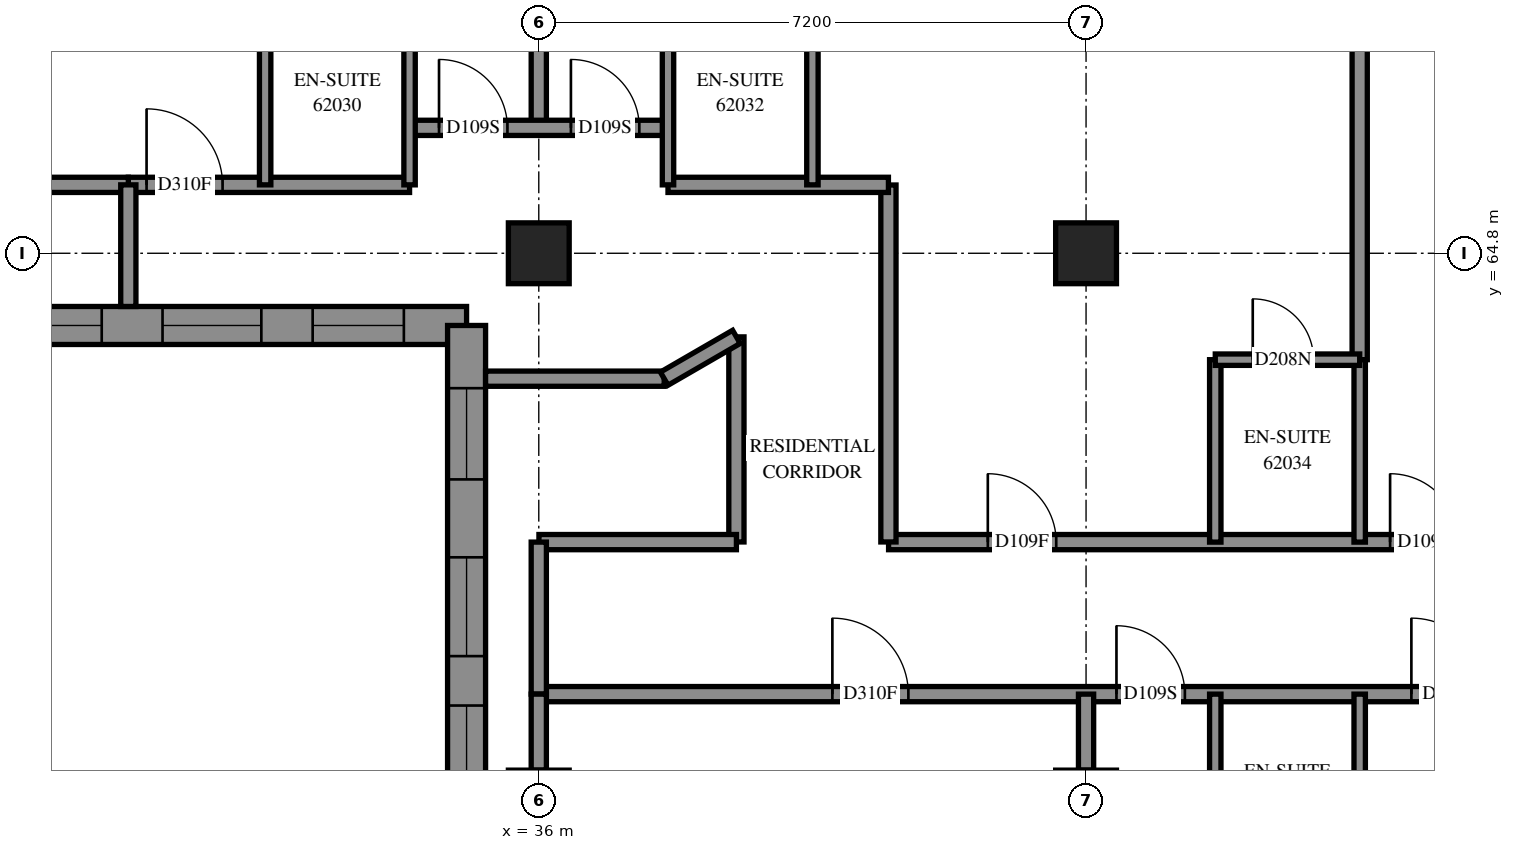
"""IFC4 building model, lengths in metres.
Left out: names, types, materials, properties, quantities, classifications, styles, units other than length and angle.
Written with IfcOpenShell. Run it as: python <this file> out.ifc"""

import sys

from ifc_helpers import new_model, si_unit, direction, frame, frame_2d, origin, origin_2d, place, context, subcontext, project, spatial, polyline, rectangle, outline, extrude, element, fill, save


model = new_model("IFC4")
c1 = context("Model", 3, precision=1e-05, world=origin(), true_north=direction((0.0, 1.0)))
c2 = subcontext(c1, "Body", "Model", "MODEL_VIEW")
j1 = project(units=[si_unit("LENGTHUNIT", "METRE"), si_unit("PLANEANGLEUNIT", "RADIAN")], contexts=[c1])
p1 = place(None, origin())
s1 = spatial("IfcSite", under=j1, at=p1, CompositionType="ELEMENT")
p2 = place(p1, origin())
s2 = spatial("IfcBuilding", under=s1, at=p2, CompositionType="ELEMENT")
p3 = place(p2, frame((0.0, 0.0, 227.0)))
s3 = spatial("IfcBuildingStorey", under=s2, at=p3, CompositionType="ELEMENT", Elevation=227.0)
for number, where, z_axis, x_axis in (
    (1, (36.0, 64.8, 0.0), (0.0, 0.0, 1.0), (1.0, 0.0, 0.0)),
    (2, (43.2, 64.8, 0.0), (0.0, 0.0, 1.0), (1.0, 0.0, 0.0)),
):
    element("IfcColumn", number, at=place(p3, frame(where, z_axis=z_axis, x_axis=x_axis)), inside=s3, PredefinedType="COLUMN", context=c2, shape_type="SweptSolid", body=[
        extrude(rectangle(XDim=0.8, YDim=0.8, at=origin_2d()), origin(), (0.0, 0.0, 1.0), 3.1),
    ])
p4 = place(p3, frame((26.617, 63.85, 0.0), z_axis=(0.0, 0.0, 1.0), x_axis=(1.0, 0.0, 0.0)))
e3 = element("IfcWall", 3, at=p4, inside=s3, PredefinedType="SOLIDWALL", context=c2, shape_type="SweptSolid", body=[
    extrude(outline(polyline([(-0.25, -0.25), (8.183, -0.25), (8.683, 0.25), (0.25, 0.25), (-0.25, -0.25)])), origin(), (0.0, 0.0, 1.0), 3.1),
])
p5 = place(p4, frame((2.333, 0.0, 0.45)))
e4 = element("IfcOpeningElement", 4, at=p5, cuts=e3, PredefinedType="OPENING", context=c2, shape_type="SweptSolid", body=[
    extrude(rectangle(XDim=1.3, YDim=2.5, at=frame_2d((0.65, 1.25))), frame((0.0, 0.26, 0.0), z_axis=(0.0, -1.0, 0.0), x_axis=(1.0, 0.0, 0.0)), (0.0, 0.0, 1.0), 0.52),
])
p6 = place(p4, frame((4.433, 0.0, 0.45)))
e5 = element("IfcOpeningElement", 5, at=p6, cuts=e3, PredefinedType="OPENING", context=c2, shape_type="SweptSolid", body=[
    extrude(rectangle(XDim=1.3, YDim=2.5, at=frame_2d((0.65, 1.25))), frame((0.0, 0.26, 0.0), z_axis=(0.0, -1.0, 0.0), x_axis=(1.0, 0.0, 0.0)), (0.0, 0.0, 1.0), 0.52),
])
p7 = place(p4, frame((0.717, 0.0, 0.45)))
e6 = element("IfcOpeningElement", 6, at=p7, cuts=e3, PredefinedType="OPENING", context=c2, shape_type="SweptSolid", body=[
    extrude(rectangle(XDim=1.2, YDim=2.5, at=frame_2d((0.6, 1.25))), frame((0.0, 0.26, 0.0), z_axis=(0.0, -1.0, 0.0), x_axis=(1.0, 0.0, 0.0)), (0.0, 0.0, 1.0), 0.52),
])
p8 = place(p4, frame((6.408, 0.0, 0.45)))
e7 = element("IfcOpeningElement", 7, at=p8, cuts=e3, PredefinedType="OPENING", context=c2, shape_type="SweptSolid", body=[
    extrude(rectangle(XDim=1.2, YDim=2.5, at=frame_2d((0.6, 1.25))), frame((0.0, 0.26, 0.0), z_axis=(0.0, -1.0, 0.0), x_axis=(1.0, 0.0, 0.0)), (0.0, 0.0, 1.0), 0.52),
])
p9 = place(p3, frame((35.05, 63.85, 0.0), z_axis=(0.0, 0.0, 1.0), x_axis=(0.0, -1.0, 0.0)))
e8 = element("IfcWall", 8, at=p9, inside=s3, PredefinedType="SOLIDWALL", context=c2, shape_type="SweptSolid", body=[
    extrude(outline(polyline([(0.25, -0.25), (7.45, -0.25), (6.95, 0.25), (-0.25, 0.25), (0.25, -0.25)])), origin(), (0.0, 0.0, 1.0), 3.1),
])
p10 = place(p9, frame((3.05, 0.0, 0.45)))
e9 = element("IfcOpeningElement", 9, at=p10, cuts=e8, PredefinedType="OPENING", context=c2, shape_type="SweptSolid", body=[
    extrude(rectangle(XDim=1.3, YDim=2.5, at=frame_2d((0.65, 1.25))), frame((0.0, 0.26, 0.0), z_axis=(0.0, -1.0, 0.0), x_axis=(1.0, 0.0, 0.0)), (0.0, 0.0, 1.0), 0.52),
])
p11 = place(p9, frame((5.0, 0.0, 0.45)))
e10 = element("IfcOpeningElement", 10, at=p11, cuts=e8, PredefinedType="OPENING", context=c2, shape_type="SweptSolid", body=[
    extrude(rectangle(XDim=1.3, YDim=2.5, at=frame_2d((0.65, 1.25))), frame((0.0, 0.26, 0.0), z_axis=(0.0, -1.0, 0.0), x_axis=(1.0, 0.0, 0.0)), (0.0, 0.0, 1.0), 0.52),
])
p12 = place(p9, frame((0.825, 0.0, 0.45)))
e11 = element("IfcOpeningElement", 11, at=p12, cuts=e8, PredefinedType="OPENING", context=c2, shape_type="SweptSolid", body=[
    extrude(rectangle(XDim=1.2, YDim=2.5, at=frame_2d((0.6, 1.25))), frame((0.0, 0.26, 0.0), z_axis=(0.0, -1.0, 0.0), x_axis=(1.0, 0.0, 0.0)), (0.0, 0.0, 1.0), 0.52),
])
p13 = place(p3, frame((36.0, 59.0, 0.0), z_axis=(0.0, 0.0, 1.0), x_axis=(1.0, 0.0, 0.0)))
e12 = element("IfcWall", 12, at=p13, inside=s3, PredefinedType="PARTITIONING", context=c2, shape_type="SweptSolid", body=[
    extrude(rectangle(XDim=17.0, YDim=0.2, at=frame_2d((8.5, 0.0))), origin(), (0.0, 0.0, 1.0), 3.1),
])
p14 = place(p13, frame((3.862, 0.0, 0.0)))
e13 = element("IfcOpeningElement", 13, at=p14, cuts=e12, PredefinedType="OPENING", context=c2, shape_type="SweptSolid", body=[
    extrude(rectangle(XDim=1.0, YDim=2.1, at=frame_2d((0.5, 1.05))), frame((0.0, 0.11, 0.0), z_axis=(0.0, -1.0, 0.0), x_axis=(1.0, 0.0, 0.0)), (0.0, 0.0, 1.0), 0.22),
])
p15 = place(p13, frame((7.6, 0.0, 0.0)))
e14 = element("IfcOpeningElement", 14, at=p15, cuts=e12, PredefinedType="OPENING", context=c2, shape_type="SweptSolid", body=[
    extrude(rectangle(XDim=0.9, YDim=2.1, at=frame_2d((0.45, 1.05))), frame((0.0, 0.11, 0.0), z_axis=(0.0, -1.0, 0.0), x_axis=(1.0, 0.0, 0.0)), (0.0, 0.0, 1.0), 0.22),
])
p16 = place(p13, frame((11.48, 0.0, 0.0)))
e15 = element("IfcOpeningElement", 15, at=p16, cuts=e12, PredefinedType="OPENING", context=c2, shape_type="SweptSolid", body=[
    extrude(rectangle(XDim=1.0, YDim=2.1, at=frame_2d((0.5, 1.05))), frame((0.0, 0.11, 0.0), z_axis=(0.0, -1.0, 0.0), x_axis=(1.0, 0.0, 0.0)), (0.0, 0.0, 1.0), 0.22),
])
p17 = place(p13, frame((15.805, 0.0, 0.0)))
e16 = element("IfcOpeningElement", 16, at=p17, cuts=e12, PredefinedType="OPENING", context=c2, shape_type="SweptSolid", body=[
    extrude(rectangle(XDim=1.0, YDim=2.1, at=frame_2d((0.5, 1.05))), frame((0.0, 0.11, 0.0), z_axis=(0.0, -1.0, 0.0), x_axis=(1.0, 0.0, 0.0)), (0.0, 0.0, 1.0), 0.22),
])
p18 = place(p3, frame((40.602, 61.0, 0.0), z_axis=(0.0, 0.0, 1.0), x_axis=(1.0, 0.0, 0.0)))
e17 = element("IfcWall", 17, at=p18, inside=s3, PredefinedType="PARTITIONING", context=c2, shape_type="SweptSolid", body=[
    extrude(rectangle(XDim=14.998, YDim=0.2, at=frame_2d((7.499, 0.0))), origin(), (0.0, 0.0, 1.0), 3.1),
])
p19 = place(p18, frame((1.306, 0.0, 0.0)))
e18 = element("IfcOpeningElement", 18, at=p19, cuts=e17, PredefinedType="OPENING", context=c2, shape_type="SweptSolid", body=[
    extrude(rectangle(XDim=0.9, YDim=2.1, at=frame_2d((0.45, 1.05))), frame((0.0, 0.11, 0.0), z_axis=(0.0, -1.0, 0.0), x_axis=(1.0, 0.0, 0.0)), (0.0, 0.0, 1.0), 0.22),
])
p20 = place(p18, frame((6.598, 0.0, 0.0)))
e19 = element("IfcOpeningElement", 19, at=p20, cuts=e17, PredefinedType="OPENING", context=c2, shape_type="SweptSolid", body=[
    extrude(rectangle(XDim=0.9, YDim=2.1, at=frame_2d((0.45, 1.05))), frame((0.0, 0.11, 0.0), z_axis=(0.0, -1.0, 0.0), x_axis=(1.0, 0.0, 0.0)), (0.0, 0.0, 1.0), 0.22),
])
p21 = place(p18, frame((12.098, 0.0, 0.0)))
e20 = element("IfcOpeningElement", 20, at=p21, cuts=e17, PredefinedType="OPENING", context=c2, shape_type="SweptSolid", body=[
    extrude(rectangle(XDim=0.9, YDim=2.1, at=frame_2d((0.45, 1.05))), frame((0.0, 0.11, 0.0), z_axis=(0.0, -1.0, 0.0), x_axis=(1.0, 0.0, 0.0)), (0.0, 0.0, 1.0), 0.22),
])
p22 = place(p18, frame((13.752, 0.0, 0.0)))
e21 = element("IfcOpeningElement", 21, at=p22, cuts=e17, PredefinedType="OPENING", context=c2, shape_type="SweptSolid", body=[
    extrude(rectangle(XDim=1.0, YDim=2.1, at=frame_2d((0.5, 1.05))), frame((0.0, 0.11, 0.0), z_axis=(0.0, -1.0, 0.0), x_axis=(1.0, 0.0, 0.0)), (0.0, 0.0, 1.0), 0.22),
])
p23 = place(p3, frame((46.8, 63.4, 0.0), z_axis=(0.0, 0.0, 1.0), x_axis=(0.0, 1.0, 0.0)))
e22 = element("IfcWall", 22, at=p23, inside=s3, PredefinedType="PARTITIONING", context=c2, shape_type="SweptSolid", body=[
    extrude(rectangle(XDim=9.492, YDim=0.2, at=frame_2d((4.746, 0.0))), origin(), (0.0, 0.0, 1.0), 3.1),
])
p24 = place(p3, frame((36.0, 66.45, 0.0), z_axis=(0.0, 0.0, 1.0), x_axis=(0.0, 1.0, 0.0)))
e23 = element("IfcWall", 23, at=p24, inside=s3, PredefinedType="PARTITIONING", context=c2, shape_type="SweptSolid", body=[
    extrude(rectangle(XDim=5.15, YDim=0.2, at=frame_2d((2.575, 0.0))), origin(), (0.0, 0.0, 1.0), 3.1),
])
p25 = place(p3, frame((40.6, 61.002, 0.0), z_axis=(0.0, 0.0, 1.0), x_axis=(0.0, 1.0, 0.0)))
e24 = element("IfcWall", 24, at=p25, inside=s3, PredefinedType="PARTITIONING", context=c2, shape_type="SweptSolid", body=[
    extrude(rectangle(XDim=4.696, YDim=0.2, at=frame_2d((2.348, 0.0))), origin(), (0.0, 0.0, 1.0), 3.1),
])
p26 = place(p3, frame((30.6, 65.7, 0.0), z_axis=(0.0, 0.0, 1.0), x_axis=(1.0, 0.0, 0.0)))
e25 = element("IfcWall", 25, at=p26, inside=s3, PredefinedType="PARTITIONING", context=c2, shape_type="SweptSolid", body=[
    extrude(rectangle(XDim=3.7, YDim=0.2, at=frame_2d((1.85, 0.0))), origin(), (0.0, 0.0, 1.0), 3.1),
])
p27 = place(p26, frame((0.24, 0.0, 0.0)))
e26 = element("IfcOpeningElement", 26, at=p27, cuts=e25, PredefinedType="OPENING", context=c2, shape_type="SweptSolid", body=[
    extrude(rectangle(XDim=1.0, YDim=2.1, at=frame_2d((0.5, 1.05))), frame((0.0, 0.11, 0.0), z_axis=(0.0, -1.0, 0.0), x_axis=(1.0, 0.0, 0.0)), (0.0, 0.0, 1.0), 0.22),
])
p28 = place(p3, frame((34.35, 66.45, 0.0), z_axis=(0.0, 0.0, 1.0), x_axis=(1.0, 0.0, 0.0)))
e27 = element("IfcWall", 27, at=p28, inside=s3, PredefinedType="PARTITIONING", context=c2, shape_type="SweptSolid", body=[
    extrude(rectangle(XDim=3.3, YDim=0.2, at=frame_2d((1.65, 0.0))), origin(), (0.0, 0.0, 1.0), 3.1),
])
p29 = place(p28, frame((0.338, 0.0, 0.0)))
e28 = element("IfcOpeningElement", 28, at=p29, cuts=e27, PredefinedType="OPENING", context=c2, shape_type="SweptSolid", body=[
    extrude(rectangle(XDim=0.9, YDim=2.1, at=frame_2d((0.45, 1.05))), frame((0.0, 0.11, 0.0), z_axis=(0.0, -1.0, 0.0), x_axis=(1.0, 0.0, 0.0)), (0.0, 0.0, 1.0), 0.22),
])
p30 = place(p28, frame((2.073, 0.0, 0.0)))
e29 = element("IfcOpeningElement", 29, at=p30, cuts=e27, PredefinedType="OPENING", context=c2, shape_type="SweptSolid", body=[
    extrude(rectangle(XDim=0.9, YDim=2.1, at=frame_2d((0.45, 1.05))), frame((0.0, 0.11, 0.0), z_axis=(0.0, -1.0, 0.0), x_axis=(1.0, 0.0, 0.0)), (0.0, 0.0, 1.0), 0.22),
])
p31 = place(p3, frame((37.7, 65.7, 0.0), z_axis=(0.0, 0.0, 1.0), x_axis=(1.0, 0.0, 0.0)))
e30 = element("IfcWall", 30, at=p31, inside=s3, PredefinedType="PARTITIONING", context=c2, shape_type="SweptSolid", body=[
    extrude(rectangle(XDim=2.9, YDim=0.2, at=frame_2d((1.45, 0.0))), origin(), (0.0, 0.0, 1.0), 3.1),
])
p32 = place(p3, frame((38.6, 61.002, 0.0), z_axis=(0.0, 0.0, 1.0), x_axis=(0.0, 1.0, 0.0)))
e31 = element("IfcWall", 31, at=p32, inside=s3, PredefinedType="PARTITIONING", context=c2, shape_type="SweptSolid", body=[
    extrude(rectangle(XDim=2.698, YDim=0.2, at=frame_2d((1.349, 0.0))), origin(), (0.0, 0.0, 1.0), 3.1),
])
p33 = place(p3, frame((36.002, 61.0, 0.0), z_axis=(0.0, 0.0, 1.0), x_axis=(1.0, 0.0, 0.0)))
e32 = element("IfcWall", 32, at=p33, inside=s3, PredefinedType="PARTITIONING", context=c2, shape_type="SweptSolid", body=[
    extrude(rectangle(XDim=2.598, YDim=0.2, at=frame_2d((1.299, 0.0))), origin(), (0.0, 0.0, 1.0), 3.1),
])
for number, where, z_axis, x_axis in (
    (33, (44.9, 56.6, 0.0), (0.0, 0.0, 1.0), (0.0, 1.0, 0.0)),
    (34, (44.9, 61.0, 0.0), (0.0, 0.0, 1.0), (0.0, 1.0, 0.0)),
    (35, (46.8, 56.6, 0.0), (0.0, 0.0, 1.0), (0.0, 1.0, 0.0)),
    (36, (46.8, 61.0, 0.0), (0.0, 0.0, 1.0), (0.0, 1.0, 0.0)),
    (37, (32.4, 65.7, 0.0), (0.0, 0.0, 1.0), (0.0, 1.0, 0.0)),
    (38, (34.3, 65.7, 0.0), (0.0, 0.0, 1.0), (0.0, 1.0, 0.0)),
    (39, (37.7, 65.7, 0.0), (0.0, 0.0, 1.0), (0.0, 1.0, 0.0)),
    (40, (39.6, 65.7, 0.0), (0.0, 0.0, 1.0), (0.0, 1.0, 0.0)),
):
    element("IfcWall", number, at=place(p3, frame(where, z_axis=z_axis, x_axis=x_axis)), inside=s3, PredefinedType="PARTITIONING", context=c2, shape_type="SweptSolid", body=[
        extrude(rectangle(XDim=2.4, YDim=0.15, at=frame_2d((1.2, 0.0))), origin(), (0.0, 0.0, 1.0), 3.1),
    ])
p34 = place(p3, frame((35.3, 63.15, 0.0), z_axis=(0.0, 0.0, 1.0), x_axis=(1.0, 0.0, 0.0)))
e41 = element("IfcWall", 41, at=p34, inside=s3, PredefinedType="PARTITIONING", context=c2, shape_type="SweptSolid", body=[
    extrude(rectangle(XDim=2.35, YDim=0.2, at=frame_2d((1.175, 0.0))), origin(), (0.0, 0.0, 1.0), 3.1),
])
p35 = place(p3, frame((36.0, 59.0, 0.0), z_axis=(0.0, 0.0, 1.0), x_axis=(0.0, 1.0, 0.0)))
e42 = element("IfcWall", 42, at=p35, inside=s3, PredefinedType="PARTITIONING", context=c2, shape_type="SweptSolid", body=[
    extrude(rectangle(XDim=2.0, YDim=0.2, at=frame_2d((1.0, 0.0))), origin(), (0.0, 0.0, 1.0), 2.6),
])
p36 = place(p3, frame((44.9, 63.4, 0.0), z_axis=(0.0, 0.0, 1.0), x_axis=(1.0, 0.0, 0.0)))
e43 = element("IfcWall", 43, at=p36, inside=s3, PredefinedType="PARTITIONING", context=c2, shape_type="SweptSolid", body=[
    extrude(rectangle(XDim=1.9, YDim=0.15, at=frame_2d((0.95, 0.0))), origin(), (0.0, 0.0, 1.0), 3.1),
])
p37 = place(p36, frame((0.493, 0.0, 0.0)))
e44 = element("IfcOpeningElement", 44, at=p37, cuts=e43, PredefinedType="OPENING", context=c2, shape_type="SweptSolid", body=[
    extrude(rectangle(XDim=0.8, YDim=2.1, at=frame_2d((0.4, 1.05))), frame((0.0, 0.085, 0.0), z_axis=(0.0, -1.0, 0.0), x_axis=(1.0, 0.0, 0.0)), (0.0, 0.0, 1.0), 0.17),
])
p38 = place(p3, frame((28.802, 65.7, 0.0), z_axis=(0.0, 0.0, 1.0), x_axis=(1.0, 0.0, 0.0)))
e45 = element("IfcWall", 45, at=p38, inside=s3, PredefinedType="PARTITIONING", context=c2, shape_type="SweptSolid", body=[
    extrude(rectangle(XDim=1.798, YDim=0.2, at=frame_2d((0.899, 0.0))), origin(), (0.0, 0.0, 1.0), 3.1),
])
p39 = place(p3, frame((30.6, 64.1, 0.0), z_axis=(0.0, 0.0, 1.0), x_axis=(0.0, 1.0, 0.0)))
e46 = element("IfcWall", 46, at=p39, inside=s3, PredefinedType="PARTITIONING", context=c2, shape_type="SweptSolid", body=[
    extrude(rectangle(XDim=1.6, YDim=0.2, at=frame_2d((0.8, 0.0))), origin(), (0.0, 0.0, 1.0), 3.1),
])
p40 = place(p3, frame((36.0, 58.0, 0.0), z_axis=(0.0, 0.0, 1.0), x_axis=(0.0, 1.0, 0.0)))
e47 = element("IfcWall", 47, at=p40, inside=s3, PredefinedType="PARTITIONING", context=c2, shape_type="SweptSolid", body=[
    extrude(rectangle(XDim=1.0, YDim=0.2, at=frame_2d((0.5, 0.0))), origin(), (0.0, 0.0, 1.0), 2.6),
])
p41 = place(p3, frame((43.2, 58.0, 0.0), z_axis=(0.0, 0.0, 1.0), x_axis=(0.0, 1.0, 0.0)))
e48 = element("IfcWall", 48, at=p41, inside=s3, PredefinedType="PARTITIONING", context=c2, shape_type="SweptSolid", body=[
    extrude(rectangle(XDim=1.0, YDim=0.2, at=frame_2d((0.5, 0.0))), origin(), (0.0, 0.0, 1.0), 3.1),
])
p42 = place(p3, frame((37.65, 63.15, 0.0), z_axis=(0.0, 0.0, 1.0), x_axis=(0.8654262855, 0.5010362705, 0.0)))
e49 = element("IfcWall", 49, at=p42, inside=s3, PredefinedType="PARTITIONING", context=c2, shape_type="SweptSolid", body=[
    extrude(rectangle(XDim=1.098, YDim=0.2, at=frame_2d((0.549, 0.0))), origin(), (0.0, 0.0, 1.0), 3.1),
])
p43 = place(p5, origin())
e50 = element("IfcWindow", 50, at=p43, inside=s3, PartitioningType="SINGLE_PANEL", PredefinedType="WINDOW", context=c2, shape_type="SweptSolid", body=[
    extrude(rectangle(XDim=1.3, YDim=2.5, at=frame_2d((0.65, 1.25))), frame((0.0, 0.18, 0.0), z_axis=(0.0, -1.0, 0.0), x_axis=(1.0, 0.0, 0.0)), (0.0, 0.0, 1.0), 0.06),
])
fill(e4, e50)
p44 = place(p6, origin())
e51 = element("IfcWindow", 51, at=p44, inside=s3, PartitioningType="SINGLE_PANEL", PredefinedType="WINDOW", context=c2, shape_type="SweptSolid", body=[
    extrude(rectangle(XDim=1.3, YDim=2.5, at=frame_2d((0.65, 1.25))), frame((0.0, 0.18, 0.0), z_axis=(0.0, -1.0, 0.0), x_axis=(1.0, 0.0, 0.0)), (0.0, 0.0, 1.0), 0.06),
])
fill(e5, e51)
p45 = place(p8, origin())
e52 = element("IfcWindow", 52, at=p45, inside=s3, PartitioningType="SINGLE_PANEL", PredefinedType="WINDOW", context=c2, shape_type="SweptSolid", body=[
    extrude(rectangle(XDim=1.2, YDim=2.5, at=frame_2d((0.6, 1.25))), frame((0.0, 0.18, 0.0), z_axis=(0.0, -1.0, 0.0), x_axis=(1.0, 0.0, 0.0)), (0.0, 0.0, 1.0), 0.06),
])
fill(e7, e52)
p46 = place(p10, origin())
e53 = element("IfcWindow", 53, at=p46, inside=s3, PartitioningType="SINGLE_PANEL", PredefinedType="WINDOW", context=c2, shape_type="SweptSolid", body=[
    extrude(rectangle(XDim=1.3, YDim=2.5, at=frame_2d((0.65, 1.25))), frame((0.0, 0.18, 0.0), z_axis=(0.0, -1.0, 0.0), x_axis=(1.0, 0.0, 0.0)), (0.0, 0.0, 1.0), 0.06),
])
fill(e9, e53)
p47 = place(p11, origin())
e54 = element("IfcWindow", 54, at=p47, inside=s3, PartitioningType="SINGLE_PANEL", PredefinedType="WINDOW", context=c2, shape_type="SweptSolid", body=[
    extrude(rectangle(XDim=1.3, YDim=2.5, at=frame_2d((0.65, 1.25))), frame((0.0, 0.18, 0.0), z_axis=(0.0, -1.0, 0.0), x_axis=(1.0, 0.0, 0.0)), (0.0, 0.0, 1.0), 0.06),
])
fill(e10, e54)
p48 = place(p12, origin())
e55 = element("IfcWindow", 55, at=p48, inside=s3, PartitioningType="SINGLE_PANEL", PredefinedType="WINDOW", context=c2, shape_type="SweptSolid", body=[
    extrude(rectangle(XDim=1.2, YDim=2.5, at=frame_2d((0.6, 1.25))), frame((0.0, 0.18, 0.0), z_axis=(0.0, -1.0, 0.0), x_axis=(1.0, 0.0, 0.0)), (0.0, 0.0, 1.0), 0.06),
])
fill(e11, e55)
p49 = place(p14, origin())
e56 = element("IfcDoor", 56, at=p49, inside=s3, OperationType="SINGLE_SWING_LEFT", PredefinedType="DOOR", context=c2, shape_type="SweptSolid", body=[
    extrude(rectangle(XDim=1.0, YDim=2.1, at=frame_2d((0.5, 1.05))), frame((0.0, 0.025, 0.0), z_axis=(0.0, -1.0, 0.0), x_axis=(1.0, 0.0, 0.0)), (0.0, 0.0, 1.0), 0.05),
])
fill(e13, e56)
p50 = place(p15, origin())
e57 = element("IfcDoor", 57, at=p50, inside=s3, OperationType="SINGLE_SWING_LEFT", PredefinedType="DOOR", context=c2, shape_type="SweptSolid", body=[
    extrude(rectangle(XDim=0.9, YDim=2.1, at=frame_2d((0.45, 1.05))), frame((0.0, 0.025, 0.0), z_axis=(0.0, -1.0, 0.0), x_axis=(1.0, 0.0, 0.0)), (0.0, 0.0, 1.0), 0.05),
])
fill(e14, e57)
p51 = place(p16, origin())
e58 = element("IfcDoor", 58, at=p51, inside=s3, OperationType="SINGLE_SWING_RIGHT", PredefinedType="DOOR", context=c2, shape_type="SweptSolid", body=[
    extrude(rectangle(XDim=1.0, YDim=2.1, at=frame_2d((0.5, 1.05))), frame((0.0, 0.025, 0.0), z_axis=(0.0, -1.0, 0.0), x_axis=(1.0, 0.0, 0.0)), (0.0, 0.0, 1.0), 0.05),
])
fill(e15, e58)
p52 = place(p27, origin())
e59 = element("IfcDoor", 59, at=p52, inside=s3, OperationType="SINGLE_SWING_RIGHT", PredefinedType="DOOR", context=c2, shape_type="SweptSolid", body=[
    extrude(rectangle(XDim=1.0, YDim=2.1, at=frame_2d((0.5, 1.05))), frame((0.0, 0.025, 0.0), z_axis=(0.0, -1.0, 0.0), x_axis=(1.0, 0.0, 0.0)), (0.0, 0.0, 1.0), 0.05),
])
fill(e26, e59)
p53 = place(p29, origin())
e60 = element("IfcDoor", 60, at=p53, inside=s3, OperationType="SINGLE_SWING_LEFT", PredefinedType="DOOR", context=c2, shape_type="SweptSolid", body=[
    extrude(rectangle(XDim=0.9, YDim=2.1, at=frame_2d((0.45, 1.05))), frame((0.0, 0.025, 0.0), z_axis=(0.0, -1.0, 0.0), x_axis=(1.0, 0.0, 0.0)), (0.0, 0.0, 1.0), 0.05),
])
fill(e28, e60)
p54 = place(p30, origin())
e61 = element("IfcDoor", 61, at=p54, inside=s3, OperationType="SINGLE_SWING_RIGHT", PredefinedType="DOOR", context=c2, shape_type="SweptSolid", body=[
    extrude(rectangle(XDim=0.9, YDim=2.1, at=frame_2d((0.45, 1.05))), frame((0.0, 0.025, 0.0), z_axis=(0.0, -1.0, 0.0), x_axis=(1.0, 0.0, 0.0)), (0.0, 0.0, 1.0), 0.05),
])
fill(e29, e61)
p55 = place(p19, origin())
e62 = element("IfcDoor", 62, at=p55, inside=s3, OperationType="SINGLE_SWING_LEFT", PredefinedType="DOOR", context=c2, shape_type="SweptSolid", body=[
    extrude(rectangle(XDim=0.9, YDim=2.1, at=frame_2d((0.45, 1.05))), frame((0.0, 0.025, 0.0), z_axis=(0.0, -1.0, 0.0), x_axis=(1.0, 0.0, 0.0)), (0.0, 0.0, 1.0), 0.05),
])
fill(e18, e62)
p56 = place(p37, origin())
e63 = element("IfcDoor", 63, at=p56, inside=s3, OperationType="SINGLE_SWING_RIGHT", PredefinedType="DOOR", context=c2, shape_type="SweptSolid", body=[
    extrude(rectangle(XDim=0.8, YDim=2.1, at=frame_2d((0.4, 1.05))), frame((0.0, 0.025, 0.0), z_axis=(0.0, -1.0, 0.0), x_axis=(1.0, 0.0, 0.0)), (0.0, 0.0, 1.0), 0.05),
])
fill(e44, e63)
p57 = place(p20, origin())
e64 = element("IfcDoor", 64, at=p57, inside=s3, OperationType="SINGLE_SWING_LEFT", PredefinedType="DOOR", context=c2, shape_type="SweptSolid", body=[
    extrude(rectangle(XDim=0.9, YDim=2.1, at=frame_2d((0.45, 1.05))), frame((0.0, 0.025, 0.0), z_axis=(0.0, -1.0, 0.0), x_axis=(1.0, 0.0, 0.0)), (0.0, 0.0, 1.0), 0.05),
])
fill(e19, e64)
save(model, sys.argv[1])
